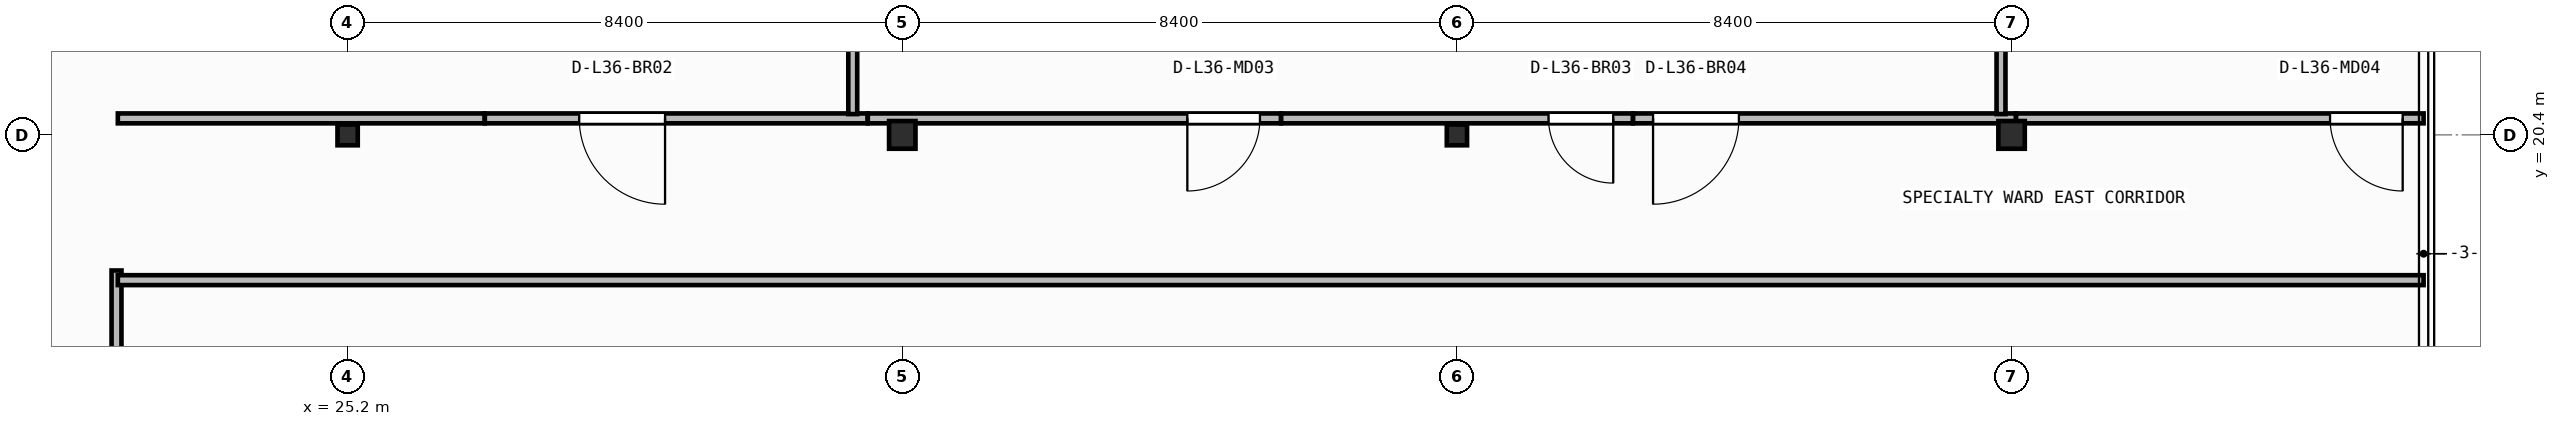
"""IFC4 building model, lengths in metres.
Left out: names, types, materials, properties, quantities, classifications, styles, units other than length and angle.
Written with IfcOpenShell. Run it as: python <this file> out.ifc"""

import sys

from ifc_helpers import new_model, si_unit, direction, frame, frame_2d, origin, origin_2d, place, context, subcontext, project, spatial, rectangle, i_section, extrude, element, fill, save


model = new_model("IFC4")
c1 = context("Model", 3, precision=1e-05, world=origin(), true_north=direction((0.0, 1.0)))
c2 = subcontext(c1, "Body", "Model", "MODEL_VIEW")
j1 = project(units=[si_unit("LENGTHUNIT", "METRE"), si_unit("PLANEANGLEUNIT", "RADIAN")], contexts=[c1])
p1 = place(None, origin())
s1 = spatial("IfcSite", under=j1, at=p1, CompositionType="ELEMENT")
p2 = place(p1, origin())
s2 = spatial("IfcBuilding", under=s1, at=p2, CompositionType="ELEMENT")
p3 = place(p2, frame((0.0, 0.0, 146.8)))
s3 = spatial("IfcBuildingStorey", under=s2, at=p3, CompositionType="ELEMENT", Elevation=146.8)
p4 = place(p3, frame((25.2, 20.4, 0.0), z_axis=(0.0, 0.0, 1.0), x_axis=(1.0, 0.0, 0.0)))
e1 = element("IfcColumn", 1, at=p4, inside=s3, PredefinedType="COLUMN", context=c2, shape_type="SweptSolid", body=[
    extrude(i_section(OverallWidth=0.307, OverallDepth=0.315, WebThickness=0.012, FlangeThickness=0.019, FilletRadius=0.017, at=origin_2d()), origin(), (0.0, 0.0, 1.0), 3.95),
])
p5 = place(p3, frame((33.6, 20.4, 0.0), z_axis=(0.0, 0.0, 1.0), x_axis=(1.0, 0.0, 0.0)))
e2 = element("IfcColumn", 2, at=p5, inside=s3, PredefinedType="COLUMN", context=c2, shape_type="SweptSolid", body=[
    extrude(i_section(OverallWidth=0.4, OverallDepth=0.42, WebThickness=0.025, FlangeThickness=0.04, at=origin_2d()), origin(), (0.0, 0.0, 1.0), 3.95),
])
p6 = place(p3, frame((42.0, 20.4, 0.0), z_axis=(0.0, 0.0, 1.0), x_axis=(1.0, 0.0, 0.0)))
e3 = element("IfcColumn", 3, at=p6, inside=s3, PredefinedType="COLUMN", context=c2, shape_type="SweptSolid", body=[
    extrude(i_section(OverallWidth=0.307, OverallDepth=0.315, WebThickness=0.012, FlangeThickness=0.019, FilletRadius=0.017, at=origin_2d()), origin(), (0.0, 0.0, 1.0), 3.95),
])
p7 = place(p3, frame((50.4, 20.4, 0.0), z_axis=(0.0, 0.0, 1.0), x_axis=(1.0, 0.0, 0.0)))
e4 = element("IfcColumn", 4, at=p7, inside=s3, PredefinedType="COLUMN", context=c2, shape_type="SweptSolid", body=[
    extrude(i_section(OverallWidth=0.4, OverallDepth=0.42, WebThickness=0.025, FlangeThickness=0.04, at=origin_2d()), origin(), (0.0, 0.0, 1.0), 3.95),
])
p8 = place(p3, frame((21.7, 14.7, 0.0), z_axis=(0.0, 0.0, 1.0), x_axis=(0.0, 1.0, 0.0)))
e5 = element("IfcWall", 5, at=p8, inside=s3, PredefinedType="PARTITIONING", context=c2, shape_type="SweptSolid", body=[
    extrude(rectangle(XDim=3.646, YDim=0.15, at=frame_2d((1.823, 0.0))), origin(), (0.0, 0.0, 1.0), 3.71),
])
p9 = place(p3, frame((21.72, 18.2, 0.0), z_axis=(0.0, 0.0, 1.0), x_axis=(1.0, 0.0, 0.0)))
e6 = element("IfcWall", 6, at=p9, inside=s3, PredefinedType="PARTITIONING", context=c2, shape_type="SweptSolid", body=[
    extrude(rectangle(XDim=34.92, YDim=0.15, at=frame_2d((17.46, 0.0))), origin(), (0.0, 0.0, 1.0), 3.71),
])
p10 = place(p3, frame((27.276, 20.65, 0.0), z_axis=(0.0, 0.0, 1.0), x_axis=(-1.0, 0.0, 0.0)))
e7 = element("IfcWall", 7, at=p10, inside=s3, PredefinedType="PARTITIONING", context=c2, shape_type="SweptSolid", body=[
    extrude(rectangle(XDim=5.556, YDim=0.15, at=frame_2d((2.778, 0.0))), origin(), (0.0, 0.0, 1.0), 3.083),
])
p11 = place(p3, frame((33.076, 20.65, 0.0), z_axis=(0.0, 0.0, 1.0), x_axis=(-1.0, 0.0, 0.0)))
e8 = element("IfcWall", 8, at=p11, inside=s3, PredefinedType="PARTITIONING", context=c2, shape_type="SweptSolid", body=[
    extrude(rectangle(XDim=5.798, YDim=0.15, at=frame_2d((2.899, 0.0))), origin(), (0.0, 0.0, 1.0), 3.083),
])
p12 = place(p11, frame((3.069, 0.0, 0.0)))
e9 = element("IfcOpeningElement", 9, at=p12, cuts=e8, PredefinedType="OPENING", context=c2, shape_type="SweptSolid", body=[
    extrude(rectangle(XDim=1.3, YDim=2.15, at=frame_2d((0.65, 1.075))), frame((0.0, 0.085, 0.0), z_axis=(0.0, -1.0, 0.0), x_axis=(1.0, 0.0, 0.0)), (0.0, 0.0, 1.0), 0.17),
])
p13 = place(p3, frame((39.336, 20.65, 0.0), z_axis=(0.0, 0.0, 1.0), x_axis=(-1.0, 0.0, 0.0)))
e10 = element("IfcWall", 10, at=p13, inside=s3, PredefinedType="PARTITIONING", context=c2, shape_type="SweptSolid", body=[
    extrude(rectangle(XDim=6.258, YDim=0.15, at=frame_2d((3.129, 0.0))), origin(), (0.0, 0.0, 1.0), 3.083),
])
p14 = place(p13, frame((0.319, 0.0, 0.0)))
e11 = element("IfcOpeningElement", 11, at=p14, cuts=e10, PredefinedType="OPENING", context=c2, shape_type="SweptSolid", body=[
    extrude(rectangle(XDim=1.1, YDim=2.1, at=frame_2d((0.55, 1.05))), frame((0.0, 0.085, 0.0), z_axis=(0.0, -1.0, 0.0), x_axis=(1.0, 0.0, 0.0)), (0.0, 0.0, 1.0), 0.17),
])
p15 = place(p3, frame((44.666, 20.65, 0.0), z_axis=(0.0, 0.0, 1.0), x_axis=(-1.0, 0.0, 0.0)))
e12 = element("IfcWall", 12, at=p15, inside=s3, PredefinedType="PARTITIONING", context=c2, shape_type="SweptSolid", body=[
    extrude(rectangle(XDim=5.328, YDim=0.15, at=frame_2d((2.664, 0.0))), origin(), (0.0, 0.0, 1.0), 3.083),
])
p16 = place(p15, frame((0.299, 0.0, 0.0)))
e13 = element("IfcOpeningElement", 13, at=p16, cuts=e12, PredefinedType="OPENING", context=c2, shape_type="SweptSolid", body=[
    extrude(rectangle(XDim=0.98, YDim=2.1, at=frame_2d((0.49, 1.05))), frame((0.0, 0.085, 0.0), z_axis=(0.0, -1.0, 0.0), x_axis=(1.0, 0.0, 0.0)), (0.0, 0.0, 1.0), 0.17),
])
p17 = place(p3, frame((50.466, 20.65, 0.0), z_axis=(0.0, 0.0, 1.0), x_axis=(-1.0, 0.0, 0.0)))
e14 = element("IfcWall", 14, at=p17, inside=s3, PredefinedType="PARTITIONING", context=c2, shape_type="SweptSolid", body=[
    extrude(rectangle(XDim=5.798, YDim=0.15, at=frame_2d((2.899, 0.0))), origin(), (0.0, 0.0, 1.0), 3.083),
])
p18 = place(p17, frame((4.196, 0.0, 0.0)))
e15 = element("IfcOpeningElement", 15, at=p18, cuts=e14, PredefinedType="OPENING", context=c2, shape_type="SweptSolid", body=[
    extrude(rectangle(XDim=1.3, YDim=2.15, at=frame_2d((0.65, 1.075))), frame((0.0, 0.085, 0.0), z_axis=(0.0, -1.0, 0.0), x_axis=(1.0, 0.0, 0.0)), (0.0, 0.0, 1.0), 0.17),
])
p19 = place(p3, frame((56.64, 20.65, 0.0), z_axis=(0.0, 0.0, 1.0), x_axis=(-1.0, 0.0, 0.0)))
e16 = element("IfcWall", 16, at=p19, inside=s3, PredefinedType="PARTITIONING", context=c2, shape_type="SweptSolid", body=[
    extrude(rectangle(XDim=6.172, YDim=0.15, at=frame_2d((3.086, 0.0))), origin(), (0.0, 0.0, 1.0), 3.71),
])
p20 = place(p19, frame((0.317, 0.0, 0.0)))
e17 = element("IfcOpeningElement", 17, at=p20, cuts=e16, PredefinedType="OPENING", context=c2, shape_type="SweptSolid", body=[
    extrude(rectangle(XDim=1.1, YDim=2.1, at=frame_2d((0.55, 1.05))), frame((0.0, 0.085, 0.0), z_axis=(0.0, -1.0, 0.0), x_axis=(1.0, 0.0, 0.0)), (0.0, 0.0, 1.0), 0.17),
])
p21 = place(p3, frame((32.85, 20.715, 0.0), z_axis=(0.0, 0.0, 1.0), x_axis=(0.0, 1.0, 0.0)))
e18 = element("IfcWall", 18, at=p21, inside=s3, PredefinedType="PARTITIONING", context=c2, shape_type="SweptSolid", body=[
    extrude(rectangle(XDim=6.385, YDim=0.135, at=frame_2d((3.192, 0.0))), origin(), (0.0, 0.0, 1.0), 3.71),
])
p22 = place(p3, frame((50.24, 20.715, 0.0), z_axis=(0.0, 0.0, 1.0), x_axis=(0.0, 1.0, 0.0)))
e19 = element("IfcWall", 19, at=p22, inside=s3, PredefinedType="PARTITIONING", context=c2, shape_type="SweptSolid", body=[
    extrude(rectangle(XDim=6.385, YDim=0.135, at=frame_2d((3.192, 0.0))), origin(), (0.0, 0.0, 1.0), 3.152),
])
p23 = place(p12, origin())
e20 = element("IfcDoor", 20, at=p23, inside=s3, OperationType="SINGLE_SWING_LEFT", PredefinedType="DOOR", context=c2, shape_type="SweptSolid", body=[
    extrude(rectangle(XDim=1.3, YDim=2.15, at=frame_2d((0.65, 1.075))), frame((0.0, 0.025, 0.0), z_axis=(0.0, -1.0, 0.0), x_axis=(1.0, 0.0, 0.0)), (0.0, 0.0, 1.0), 0.05),
])
fill(e9, e20)
p24 = place(p14, origin())
e21 = element("IfcDoor", 21, at=p24, inside=s3, OperationType="SINGLE_SWING_RIGHT", PredefinedType="DOOR", context=c2, shape_type="SweptSolid", body=[
    extrude(rectangle(XDim=1.1, YDim=2.1, at=frame_2d((0.55, 1.05))), frame((0.0, 0.025, 0.0), z_axis=(0.0, -1.0, 0.0), x_axis=(1.0, 0.0, 0.0)), (0.0, 0.0, 1.0), 0.05),
])
fill(e11, e21)
p25 = place(p16, origin())
e22 = element("IfcDoor", 22, at=p25, inside=s3, OperationType="SINGLE_SWING_LEFT", PredefinedType="DOOR", context=c2, shape_type="SweptSolid", body=[
    extrude(rectangle(XDim=0.98, YDim=2.1, at=frame_2d((0.49, 1.05))), frame((0.0, 0.025, 0.0), z_axis=(0.0, -1.0, 0.0), x_axis=(1.0, 0.0, 0.0)), (0.0, 0.0, 1.0), 0.05),
])
fill(e13, e22)
p26 = place(p18, origin())
e23 = element("IfcDoor", 23, at=p26, inside=s3, OperationType="SINGLE_SWING_RIGHT", PredefinedType="DOOR", context=c2, shape_type="SweptSolid", body=[
    extrude(rectangle(XDim=1.3, YDim=2.15, at=frame_2d((0.65, 1.075))), frame((0.0, 0.025, 0.0), z_axis=(0.0, -1.0, 0.0), x_axis=(1.0, 0.0, 0.0)), (0.0, 0.0, 1.0), 0.05),
])
fill(e15, e23)
p27 = place(p20, origin())
e24 = element("IfcDoor", 24, at=p27, inside=s3, OperationType="SINGLE_SWING_LEFT", PredefinedType="DOOR", context=c2, shape_type="SweptSolid", body=[
    extrude(rectangle(XDim=1.1, YDim=2.1, at=frame_2d((0.55, 1.05))), frame((0.0, 0.025, 0.0), z_axis=(0.0, -1.0, 0.0), x_axis=(1.0, 0.0, 0.0)), (0.0, 0.0, 1.0), 0.05),
])
fill(e17, e24)
save(model, sys.argv[1])
